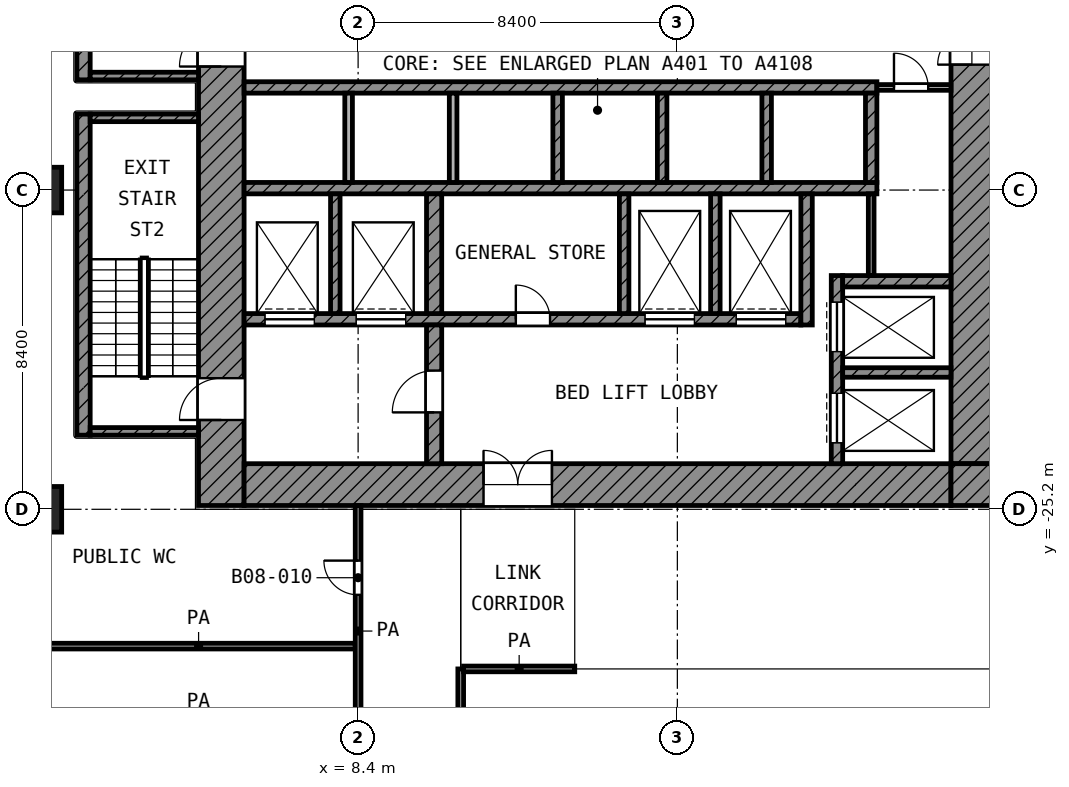
"""IFC4 building model, lengths in metres.
Left out: names, types, materials, properties, quantities, classifications, styles, units other than length and angle.
Written with IfcOpenShell. Run it as: python <this file> out.ifc"""

import sys

from ifc_helpers import new_model, si_unit, direction, frame, frame_2d, origin, origin_2d, place, context, subcontext, project, spatial, rectangle, extrude, element, fill, save


model = new_model("IFC4")
c1 = context("Model", 3, precision=1e-05, world=origin(), true_north=direction((0.0, 1.0)))
c2 = subcontext(c1, "Body", "Model", "MODEL_VIEW")
j1 = project(units=[si_unit("LENGTHUNIT", "METRE"), si_unit("PLANEANGLEUNIT", "RADIAN")], contexts=[c1])
p1 = place(None, origin())
s1 = spatial("IfcSite", under=j1, at=p1, CompositionType="ELEMENT")
p2 = place(p1, origin())
s2 = spatial("IfcBuilding", under=s1, at=p2, CompositionType="ELEMENT")
p3 = place(p2, frame((0.0, 0.0, 39.2)))
s3 = spatial("IfcBuildingStorey", under=s2, at=p3, CompositionType="ELEMENT", Elevation=39.2)
for number, where, z_axis, x_axis in (
    (1, (0.0, -16.8, 0.0), (0.0, 0.0, 1.0), (1.0, 0.0, 0.0)),
    (2, (0.0, -25.2, 0.0), (0.0, 0.0, 1.0), (1.0, 0.0, 0.0)),
):
    element("IfcColumn", number, at=place(p3, frame(where, z_axis=z_axis, x_axis=x_axis)), inside=s3, PredefinedType="COLUMN", context=c2, shape_type="SweptSolid", body=[
        extrude(rectangle(XDim=1.2, YDim=1.2, at=origin_2d()), origin(), (0.0, 0.0, 1.0), 4.2),
    ])
p4 = place(p3, frame((4.8, -25.1, 0.0), z_axis=(0.0, 0.0, 1.0), x_axis=(0.0, 1.0, 0.0)))
e3 = element("IfcWall", 3, at=p4, inside=s3, PredefinedType="SHEAR", context=c2, shape_type="SweptSolid", body=[
    extrude(rectangle(XDim=19.7, YDim=1.2, at=frame_2d((9.85, 0.0))), origin(), (0.0, 0.0, 1.0), 3.9),
])
p5 = place(p4, frame((11.55, 0.0, 0.0)))
e4 = element("IfcOpeningElement", 4, at=p5, cuts=e3, PredefinedType="OPENING", context=c2, shape_type="SweptSolid", body=[
    extrude(rectangle(XDim=1.1, YDim=2.1, at=frame_2d((0.55, 1.05))), frame((0.0, 0.61, 0.0), z_axis=(0.0, -1.0, 0.0), x_axis=(1.0, 0.0, 0.0)), (0.0, 0.0, 1.0), 1.22),
])
p6 = place(p4, frame((2.25, 0.0, 0.0)))
e5 = element("IfcOpeningElement", 5, at=p6, cuts=e3, PredefinedType="OPENING", context=c2, shape_type="SweptSolid", body=[
    extrude(rectangle(XDim=1.1, YDim=2.1, at=frame_2d((0.55, 1.05))), frame((0.0, 0.61, 0.0), z_axis=(0.0, -1.0, 0.0), x_axis=(1.0, 0.0, 0.0)), (0.0, 0.0, 1.0), 1.22),
])
p7 = place(p3, frame((24.55, -24.0, 0.0), z_axis=(0.0, 0.0, 1.0), x_axis=(0.0, 1.0, 0.0)))
e6 = element("IfcWall", 6, at=p7, inside=s3, PredefinedType="SHEAR", context=c2, shape_type="SweptSolid", body=[
    extrude(rectangle(XDim=18.6, YDim=1.1, at=frame_2d((9.3, 0.0))), origin(), (0.0, 0.0, 1.0), 3.9),
])
p8 = place(p7, frame((10.5, 0.0, 0.0)))
e7 = element("IfcOpeningElement", 7, at=p8, cuts=e6, PredefinedType="OPENING", context=c2, shape_type="SweptSolid", body=[
    extrude(rectangle(XDim=1.8, YDim=2.1, at=frame_2d((0.9, 1.05))), frame((0.0, 0.56, 0.0), z_axis=(0.0, -1.0, 0.0), x_axis=(1.0, 0.0, 0.0)), (0.0, 0.0, 1.0), 1.12),
])
p9 = place(p3, frame((5.4, -24.55, 0.0), z_axis=(0.0, 0.0, 1.0), x_axis=(1.0, 0.0, 0.0)))
e8 = element("IfcWall", 8, at=p9, inside=s3, PredefinedType="SHEAR", context=c2, shape_type="SweptSolid", body=[
    extrude(rectangle(XDim=18.6, YDim=1.1, at=frame_2d((9.3, 0.0))), origin(), (0.0, 0.0, 1.0), 3.9),
])
p10 = place(p9, frame((6.3, 0.0, 0.0)))
e9 = element("IfcOpeningElement", 9, at=p10, cuts=e8, PredefinedType="OPENING", context=c2, shape_type="SweptSolid", body=[
    extrude(rectangle(XDim=1.8, YDim=2.1, at=frame_2d((0.9, 1.05))), frame((0.0, 0.56, 0.0), z_axis=(0.0, -1.0, 0.0), x_axis=(1.0, 0.0, 0.0)), (0.0, 0.0, 1.0), 1.12),
])
p11 = place(p3, frame((24.55, -25.1, 0.0), z_axis=(0.0, 0.0, 1.0), x_axis=(0.0, 1.0, 0.0)))
e10 = element("IfcWall", 10, at=p11, inside=s3, PredefinedType="SHEAR", context=c2, shape_type="SweptSolid", body=[
    extrude(rectangle(XDim=1.1, YDim=1.1, at=frame_2d((0.55, 0.0))), origin(), (0.0, 0.0, 1.0), 3.9),
])
for number, where, z_axis, x_axis in (
    (11, (5.4, -14.1, 0.0), (0.0, 0.0, 1.0), (1.0, 0.0, 0.0)),
    (12, (5.4, -16.75, 0.0), (0.0, 0.0, 1.0), (1.0, 0.0, 0.0)),
):
    element("IfcWall", number, at=place(p3, frame(where, z_axis=z_axis, x_axis=x_axis)), inside=s3, PredefinedType="SHEAR", context=c2, shape_type="SweptSolid", body=[
        extrude(rectangle(XDim=16.65, YDim=0.3, at=frame_2d((8.325, 0.0))), origin(), (0.0, 0.0, 1.0), 3.9),
    ])
p12 = place(p3, frame((5.4, -20.2, 0.0), z_axis=(0.0, 0.0, 1.0), x_axis=(1.0, 0.0, 0.0)))
e13 = element("IfcWall", 13, at=p12, inside=s3, PredefinedType="SHEAR", context=c2, shape_type="SweptSolid", body=[
    extrude(rectangle(XDim=14.65, YDim=0.3, at=frame_2d((7.325, 0.0))), origin(), (0.0, 0.0, 1.0), 3.9),
])
p13 = place(p12, frame((10.55, 0.0, 0.0)))
e14 = element("IfcOpeningElement", 14, at=p13, cuts=e13, PredefinedType="OPENING", context=c2, shape_type="SweptSolid", body=[
    extrude(rectangle(XDim=1.3, YDim=2.1, at=frame_2d((0.65, 1.05))), frame((0.0, 0.16, 0.0), z_axis=(0.0, -1.0, 0.0), x_axis=(1.0, 0.0, 0.0)), (0.0, 0.0, 1.0), 0.32),
])
p14 = place(p12, frame((12.95, 0.0, 0.0)))
e15 = element("IfcOpeningElement", 15, at=p14, cuts=e13, PredefinedType="OPENING", context=c2, shape_type="SweptSolid", body=[
    extrude(rectangle(XDim=1.3, YDim=2.1, at=frame_2d((0.65, 1.05))), frame((0.0, 0.16, 0.0), z_axis=(0.0, -1.0, 0.0), x_axis=(1.0, 0.0, 0.0)), (0.0, 0.0, 1.0), 0.32),
])
p15 = place(p12, frame((0.55, 0.0, 0.0)))
e16 = element("IfcOpeningElement", 16, at=p15, cuts=e13, PredefinedType="OPENING", context=c2, shape_type="SweptSolid", body=[
    extrude(rectangle(XDim=1.3, YDim=2.1, at=frame_2d((0.65, 1.05))), frame((0.0, 0.16, 0.0), z_axis=(0.0, -1.0, 0.0), x_axis=(1.0, 0.0, 0.0)), (0.0, 0.0, 1.0), 0.32),
])
p16 = place(p12, frame((2.95, 0.0, 0.0)))
e17 = element("IfcOpeningElement", 17, at=p16, cuts=e13, PredefinedType="OPENING", context=c2, shape_type="SweptSolid", body=[
    extrude(rectangle(XDim=1.3, YDim=2.1, at=frame_2d((0.65, 1.05))), frame((0.0, 0.16, 0.0), z_axis=(0.0, -1.0, 0.0), x_axis=(1.0, 0.0, 0.0)), (0.0, 0.0, 1.0), 0.32),
])
p17 = place(p12, frame((7.15, 0.0, 0.0)))
e18 = element("IfcOpeningElement", 18, at=p17, cuts=e13, PredefinedType="OPENING", context=c2, shape_type="SweptSolid", body=[
    extrude(rectangle(XDim=0.9, YDim=2.1, at=frame_2d((0.45, 1.05))), frame((0.0, 0.16, 0.0), z_axis=(0.0, -1.0, 0.0), x_axis=(1.0, 0.0, 0.0)), (0.0, 0.0, 1.0), 0.32),
])
p18 = place(p3, frame((10.4, -24.0, 0.0), z_axis=(0.0, 0.0, 1.0), x_axis=(0.0, 1.0, 0.0)))
e19 = element("IfcWall", 19, at=p18, inside=s3, PredefinedType="SHEAR", context=c2, shape_type="SweptSolid", body=[
    extrude(rectangle(XDim=3.65, YDim=0.4, at=frame_2d((1.825, 0.0))), origin(), (0.0, 0.0, 1.0), 3.9),
])
p19 = place(p18, frame((1.35, 0.0, 0.0)))
e20 = element("IfcOpeningElement", 20, at=p19, cuts=e19, PredefinedType="OPENING", context=c2, shape_type="SweptSolid", body=[
    extrude(rectangle(XDim=1.1, YDim=2.1, at=frame_2d((0.55, 1.05))), frame((0.0, 0.21, 0.0), z_axis=(0.0, -1.0, 0.0), x_axis=(1.0, 0.0, 0.0)), (0.0, 0.0, 1.0), 0.42),
])
p20 = place(p3, frame((10.4, -20.05, 0.0), z_axis=(0.0, 0.0, 1.0), x_axis=(0.0, 1.0, 0.0)))
e21 = element("IfcWall", 21, at=p20, inside=s3, PredefinedType="SHEAR", context=c2, shape_type="SweptSolid", body=[
    extrude(rectangle(XDim=3.15, YDim=0.4, at=frame_2d((1.575, 0.0))), origin(), (0.0, 0.0, 1.0), 3.9),
])
p21 = place(p3, frame((20.2, -20.35, 0.0), z_axis=(0.0, 0.0, 1.0), x_axis=(0.0, 1.0, 0.0)))
e22 = element("IfcWall", 22, at=p21, inside=s3, PredefinedType="SHEAR", context=c2, shape_type="SweptSolid", body=[
    extrude(rectangle(XDim=3.45, YDim=0.3, at=frame_2d((1.725, 0.0))), origin(), (0.0, 0.0, 1.0), 3.9),
])
p22 = place(p3, frame((21.9, -16.6, 0.0), z_axis=(0.0, 0.0, 1.0), x_axis=(0.0, 1.0, 0.0)))
e23 = element("IfcWall", 23, at=p22, inside=s3, PredefinedType="SHEAR", context=c2, shape_type="SweptSolid", body=[
    extrude(rectangle(XDim=2.35, YDim=0.3, at=frame_2d((1.175, 0.0))), origin(), (0.0, 0.0, 1.0), 3.9),
])
p23 = place(p3, frame((21.15, -19.2, 0.0), z_axis=(0.0, 0.0, 1.0), x_axis=(1.0, 0.0, 0.0)))
e24 = element("IfcWall", 24, at=p23, inside=s3, PredefinedType="SHEAR", context=c2, shape_type="SweptSolid", body=[
    extrude(rectangle(XDim=2.85, YDim=0.3, at=frame_2d((1.425, 0.0))), origin(), (0.0, 0.0, 1.0), 3.9),
])
p24 = place(p3, frame((21.0, -24.0, 0.0), z_axis=(0.0, 0.0, 1.0), x_axis=(0.0, 1.0, 0.0)))
e25 = element("IfcWall", 25, at=p24, inside=s3, PredefinedType="SHEAR", context=c2, shape_type="SweptSolid", body=[
    extrude(rectangle(XDim=4.95, YDim=0.3, at=frame_2d((2.475, 0.0))), origin(), (0.0, 0.0, 1.0), 3.9),
])
p25 = place(p24, frame((2.95, 0.0, 0.0)))
e26 = element("IfcOpeningElement", 26, at=p25, cuts=e25, PredefinedType="OPENING", context=c2, shape_type="SweptSolid", body=[
    extrude(rectangle(XDim=1.3, YDim=2.1, at=frame_2d((0.65, 1.05))), frame((0.0, 0.16, 0.0), z_axis=(0.0, -1.0, 0.0), x_axis=(1.0, 0.0, 0.0)), (0.0, 0.0, 1.0), 0.32),
])
p26 = place(p24, frame((0.55, 0.0, 0.0)))
e27 = element("IfcOpeningElement", 27, at=p26, cuts=e25, PredefinedType="OPENING", context=c2, shape_type="SweptSolid", body=[
    extrude(rectangle(XDim=1.3, YDim=2.1, at=frame_2d((0.65, 1.05))), frame((0.0, 0.16, 0.0), z_axis=(0.0, -1.0, 0.0), x_axis=(1.0, 0.0, 0.0)), (0.0, 0.0, 1.0), 0.32),
])
p27 = place(p3, frame((21.15, -21.6, 0.0), z_axis=(0.0, 0.0, 1.0), x_axis=(1.0, 0.0, 0.0)))
e28 = element("IfcWall", 28, at=p27, inside=s3, PredefinedType="SHEAR", context=c2, shape_type="SweptSolid", body=[
    extrude(rectangle(XDim=2.85, YDim=0.25, at=frame_2d((1.425, 0.0))), origin(), (0.0, 0.0, 1.0), 3.9),
])
for number, where, z_axis, x_axis in (
    (29, (7.8, -20.05, 0.0), (0.0, 0.0, 1.0), (0.0, 1.0, 0.0)),
    (30, (15.4, -20.05, 0.0), (0.0, 0.0, 1.0), (0.0, 1.0, 0.0)),
    (31, (17.8, -20.05, 0.0), (0.0, 0.0, 1.0), (0.0, 1.0, 0.0)),
):
    element("IfcWall", number, at=place(p3, frame(where, z_axis=z_axis, x_axis=x_axis)), inside=s3, PredefinedType="SHEAR", context=c2, shape_type="SweptSolid", body=[
        extrude(rectangle(XDim=3.15, YDim=0.25, at=frame_2d((1.575, 0.0))), origin(), (0.0, 0.0, 1.0), 3.9),
    ])
for number, where, z_axis, x_axis in (
    (32, (8.15, -16.6, 0.0), (0.0, 0.0, 1.0), (0.0, 1.0, 0.0)),
    (33, (10.9, -16.6, 0.0), (0.0, 0.0, 1.0), (0.0, 1.0, 0.0)),
):
    element("IfcWall", number, at=place(p3, frame(where, z_axis=z_axis, x_axis=x_axis)), inside=s3, PredefinedType="PARTITIONING", context=c2, shape_type="SweptSolid", body=[
        extrude(rectangle(XDim=2.35, YDim=0.2, at=frame_2d((1.175, 0.0))), origin(), (0.0, 0.0, 1.0), 3.9),
    ])
for number, where, z_axis, x_axis in (
    (34, (13.65, -16.6, 0.0), (0.0, 0.0, 1.0), (0.0, 1.0, 0.0)),
    (35, (16.4, -16.6, 0.0), (0.0, 0.0, 1.0), (0.0, 1.0, 0.0)),
    (36, (19.15, -16.6, 0.0), (0.0, 0.0, 1.0), (0.0, 1.0, 0.0)),
):
    element("IfcWall", number, at=place(p3, frame(where, z_axis=z_axis, x_axis=x_axis)), inside=s3, PredefinedType="SHEAR", context=c2, shape_type="SweptSolid", body=[
        extrude(rectangle(XDim=2.35, YDim=0.25, at=frame_2d((1.175, 0.0))), origin(), (0.0, 0.0, 1.0), 3.9),
    ])
p28 = place(p3, frame((21.9, -19.05, 0.0), z_axis=(0.0, 0.0, 1.0), x_axis=(0.0, 1.0, 0.0)))
e37 = element("IfcWall", 37, at=p28, inside=s3, PredefinedType="PARTITIONING", context=c2, shape_type="SweptSolid", body=[
    extrude(rectangle(XDim=2.15, YDim=0.15, at=frame_2d((1.075, 0.0))), origin(), (0.0, 0.0, 1.0), 3.9),
])
p29 = place(p3, frame((22.05, -14.1, 0.0), z_axis=(0.0, 0.0, 1.0), x_axis=(1.0, 0.0, 0.0)))
e38 = element("IfcWall", 38, at=p29, inside=s3, PredefinedType="PARTITIONING", context=c2, shape_type="SweptSolid", body=[
    extrude(rectangle(XDim=1.95, YDim=0.15, at=frame_2d((0.975, 0.0))), origin(), (0.0, 0.0, 1.0), 3.9),
])
p30 = place(p29, frame((0.45, 0.0, 0.0)))
e39 = element("IfcOpeningElement", 39, at=p30, cuts=e38, PredefinedType="OPENING", context=c2, shape_type="SweptSolid", body=[
    extrude(rectangle(XDim=0.9, YDim=2.1, at=frame_2d((0.45, 1.05))), frame((0.0, 0.085, 0.0), z_axis=(0.0, -1.0, 0.0), x_axis=(1.0, 0.0, 0.0)), (0.0, 0.0, 1.0), 0.17),
])
p31 = place(p3, frame((1.175, -13.9, 0.0), z_axis=(0.0, 0.0, 1.0), x_axis=(0.0, 1.0, 0.0)))
e40 = element("IfcWall", 40, at=p31, inside=s3, PredefinedType="SHEAR", context=c2, shape_type="SweptSolid", body=[
    extrude(rectangle(XDim=8.45, YDim=0.35, at=frame_2d((4.225, 0.0))), origin(), (0.0, 0.0, 1.0), 3.9),
])
p32 = place(p3, frame((1.35, -13.8, 0.0), z_axis=(0.0, 0.0, 1.0), x_axis=(1.0, 0.0, 0.0)))
e41 = element("IfcWall", 41, at=p32, inside=s3, PredefinedType="SHEAR", context=c2, shape_type="SweptSolid", body=[
    extrude(rectangle(XDim=2.85, YDim=0.2, at=frame_2d((1.425, 0.0))), origin(), (0.0, 0.0, 1.0), 3.9),
])
p33 = place(p3, frame((1.175, -23.25, 0.0), z_axis=(0.0, 0.0, 1.0), x_axis=(0.0, 1.0, 0.0)))
e42 = element("IfcWall", 42, at=p33, inside=s3, PredefinedType="SHEAR", context=c2, shape_type="SweptSolid", body=[
    extrude(rectangle(XDim=8.45, YDim=0.35, at=frame_2d((4.225, 0.0))), origin(), (0.0, 0.0, 1.0), 3.9),
])
for number, where, z_axis, x_axis in (
    (43, (1.35, -14.9, 0.0), (0.0, 0.0, 1.0), (1.0, 0.0, 0.0)),
    (44, (1.35, -23.15, 0.0), (0.0, 0.0, 1.0), (1.0, 0.0, 0.0)),
):
    element("IfcWall", number, at=place(p3, frame(where, z_axis=z_axis, x_axis=x_axis)), inside=s3, PredefinedType="SHEAR", context=c2, shape_type="SweptSolid", body=[
        extrude(rectangle(XDim=2.85, YDim=0.2, at=frame_2d((1.425, 0.0))), origin(), (0.0, 0.0, 1.0), 3.9),
    ])
p34 = place(p3, frame((11.175, -29.4, 0.0), z_axis=(0.0, 0.0, 1.0), x_axis=(1.0, 0.0, 0.0)))
e45 = element("IfcWall", 45, at=p34, inside=s3, PredefinedType="PARTITIONING", context=c2, shape_type="SweptSolid", body=[
    extrude(rectangle(XDim=2.925, YDim=0.15, at=frame_2d((1.462, 0.0))), origin(), (0.0, 0.0, 1.0), 3.9),
])
p35 = place(p3, frame((0.08, -28.8, 0.0), z_axis=(0.0, 0.0, 1.0), x_axis=(1.0, 0.0, 0.0)))
e46 = element("IfcWall", 46, at=p35, inside=s3, PredefinedType="PARTITIONING", context=c2, shape_type="SweptSolid", body=[
    extrude(rectangle(XDim=8.245, YDim=0.15, at=frame_2d((4.123, 0.0))), origin(), (0.0, 0.0, 1.0), 3.9),
])
p36 = place(p3, frame((8.4, -31.707, 0.0), z_axis=(0.0, 0.0, 1.0), x_axis=(0.0, 1.0, 0.0)))
e47 = element("IfcWall", 47, at=p36, inside=s3, PredefinedType="PARTITIONING", context=c2, shape_type="SweptSolid", body=[
    extrude(rectangle(XDim=6.607, YDim=0.15, at=frame_2d((3.303, 0.0))), origin(), (0.0, 0.0, 1.0), 3.9),
])
p37 = place(p36, frame((4.257, 0.0, 0.0)))
e48 = element("IfcOpeningElement", 48, at=p37, cuts=e47, PredefinedType="OPENING", context=c2, shape_type="SweptSolid", body=[
    extrude(rectangle(XDim=0.9, YDim=2.1, at=frame_2d((0.45, 1.05))), frame((0.0, 0.085, 0.0), z_axis=(0.0, -1.0, 0.0), x_axis=(1.0, 0.0, 0.0)), (0.0, 0.0, 1.0), 0.17),
])
p38 = place(p3, frame((11.1, -75.52, 0.0), z_axis=(0.0, 0.0, 1.0), x_axis=(0.0, 1.0, 0.0)))
e49 = element("IfcWall", 49, at=p38, inside=s3, PredefinedType="PARTITIONING", context=c2, shape_type="SweptSolid", body=[
    extrude(rectangle(XDim=46.12, YDim=0.15, at=frame_2d((23.06, 0.0))), origin(), (0.0, 0.0, 1.0), 3.9),
])
p39 = place(p38, frame((40.87, 0.0, 0.0)))
e50 = element("IfcOpeningElement", 50, at=p39, cuts=e49, PredefinedType="OPENING", context=c2, shape_type="SweptSolid", body=[
    extrude(rectangle(XDim=1.5, YDim=2.1, at=frame_2d((0.75, 1.05))), frame((0.0, 0.085, 0.0), z_axis=(0.0, -1.0, 0.0), x_axis=(1.0, 0.0, 0.0)), (0.0, 0.0, 1.0), 0.17),
])
p40 = place(p38, frame((32.62, 0.0, 0.0)))
e51 = element("IfcOpeningElement", 51, at=p40, cuts=e49, PredefinedType="OPENING", context=c2, shape_type="SweptSolid", body=[
    extrude(rectangle(XDim=1.5, YDim=2.1, at=frame_2d((0.75, 1.05))), frame((0.0, 0.085, 0.0), z_axis=(0.0, -1.0, 0.0), x_axis=(1.0, 0.0, 0.0)), (0.0, 0.0, 1.0), 0.17),
])
p41 = place(p38, frame((18.47, 0.0, 0.0)))
e52 = element("IfcOpeningElement", 52, at=p41, cuts=e49, PredefinedType="OPENING", context=c2, shape_type="SweptSolid", body=[
    extrude(rectangle(XDim=1.0, YDim=2.1, at=frame_2d((0.5, 1.05))), frame((0.0, 0.085, 0.0), z_axis=(0.0, -1.0, 0.0), x_axis=(1.0, 0.0, 0.0)), (0.0, 0.0, 1.0), 0.17),
])
p42 = place(p38, frame((3.37, 0.0, 0.0)))
e53 = element("IfcOpeningElement", 53, at=p42, cuts=e49, PredefinedType="OPENING", context=c2, shape_type="SweptSolid", body=[
    extrude(rectangle(XDim=1.5, YDim=2.1, at=frame_2d((0.75, 1.05))), frame((0.0, 0.085, 0.0), z_axis=(0.0, -1.0, 0.0), x_axis=(1.0, 0.0, 0.0)), (0.0, 0.0, 1.0), 0.17),
])
p43 = place(p25, origin())
e54 = element("IfcDoor", 54, at=p43, inside=s3, OperationType="DOUBLE_DOOR_SLIDING", PredefinedType="DOOR", context=c2, shape_type="SweptSolid", body=[
    extrude(rectangle(XDim=1.3, YDim=2.1, at=frame_2d((0.65, 1.05))), frame((0.0, 0.025, 0.0), z_axis=(0.0, -1.0, 0.0), x_axis=(1.0, 0.0, 0.0)), (0.0, 0.0, 1.0), 0.05),
])
fill(e26, e54)
p44 = place(p26, origin())
e55 = element("IfcDoor", 55, at=p44, inside=s3, OperationType="DOUBLE_DOOR_SLIDING", PredefinedType="DOOR", context=c2, shape_type="SweptSolid", body=[
    extrude(rectangle(XDim=1.3, YDim=2.1, at=frame_2d((0.65, 1.05))), frame((0.0, 0.025, 0.0), z_axis=(0.0, -1.0, 0.0), x_axis=(1.0, 0.0, 0.0)), (0.0, 0.0, 1.0), 0.05),
])
fill(e27, e55)
p45 = place(p13, origin())
e56 = element("IfcDoor", 56, at=p45, inside=s3, OperationType="DOUBLE_DOOR_SLIDING", PredefinedType="DOOR", context=c2, shape_type="SweptSolid", body=[
    extrude(rectangle(XDim=1.3, YDim=2.1, at=frame_2d((0.65, 1.05))), frame((0.0, 0.025, 0.0), z_axis=(0.0, -1.0, 0.0), x_axis=(1.0, 0.0, 0.0)), (0.0, 0.0, 1.0), 0.05),
])
fill(e14, e56)
p46 = place(p14, origin())
e57 = element("IfcDoor", 57, at=p46, inside=s3, OperationType="DOUBLE_DOOR_SLIDING", PredefinedType="DOOR", context=c2, shape_type="SweptSolid", body=[
    extrude(rectangle(XDim=1.3, YDim=2.1, at=frame_2d((0.65, 1.05))), frame((0.0, 0.025, 0.0), z_axis=(0.0, -1.0, 0.0), x_axis=(1.0, 0.0, 0.0)), (0.0, 0.0, 1.0), 0.05),
])
fill(e15, e57)
p47 = place(p15, origin())
e58 = element("IfcDoor", 58, at=p47, inside=s3, OperationType="DOUBLE_DOOR_SLIDING", PredefinedType="DOOR", context=c2, shape_type="SweptSolid", body=[
    extrude(rectangle(XDim=1.3, YDim=2.1, at=frame_2d((0.65, 1.05))), frame((0.0, 0.025, 0.0), z_axis=(0.0, -1.0, 0.0), x_axis=(1.0, 0.0, 0.0)), (0.0, 0.0, 1.0), 0.05),
])
fill(e16, e58)
p48 = place(p16, origin())
e59 = element("IfcDoor", 59, at=p48, inside=s3, OperationType="DOUBLE_DOOR_SLIDING", PredefinedType="DOOR", context=c2, shape_type="SweptSolid", body=[
    extrude(rectangle(XDim=1.3, YDim=2.1, at=frame_2d((0.65, 1.05))), frame((0.0, 0.025, 0.0), z_axis=(0.0, -1.0, 0.0), x_axis=(1.0, 0.0, 0.0)), (0.0, 0.0, 1.0), 0.05),
])
fill(e17, e59)
p49 = place(p5, origin())
e60 = element("IfcDoor", 60, at=p49, inside=s3, OperationType="SINGLE_SWING_LEFT", PredefinedType="DOOR", context=c2, shape_type="SweptSolid", body=[
    extrude(rectangle(XDim=1.1, YDim=2.1, at=frame_2d((0.55, 1.05))), frame((0.0, 0.025, 0.0), z_axis=(0.0, -1.0, 0.0), x_axis=(1.0, 0.0, 0.0)), (0.0, 0.0, 1.0), 0.05),
])
fill(e4, e60)
p50 = place(p6, origin())
e61 = element("IfcDoor", 61, at=p50, inside=s3, OperationType="SINGLE_SWING_LEFT", PredefinedType="DOOR", context=c2, shape_type="SweptSolid", body=[
    extrude(rectangle(XDim=1.1, YDim=2.1, at=frame_2d((0.55, 1.05))), frame((0.0, 0.025, 0.0), z_axis=(0.0, -1.0, 0.0), x_axis=(1.0, 0.0, 0.0)), (0.0, 0.0, 1.0), 0.05),
])
fill(e5, e61)
p51 = place(p19, origin())
e62 = element("IfcDoor", 62, at=p51, inside=s3, OperationType="SINGLE_SWING_LEFT", PredefinedType="DOOR", context=c2, shape_type="SweptSolid", body=[
    extrude(rectangle(XDim=1.1, YDim=2.1, at=frame_2d((0.55, 1.05))), frame((0.0, 0.025, 0.0), z_axis=(0.0, -1.0, 0.0), x_axis=(1.0, 0.0, 0.0)), (0.0, 0.0, 1.0), 0.05),
])
fill(e20, e62)
p52 = place(p8, origin())
e63 = element("IfcDoor", 63, at=p52, inside=s3, OperationType="DOUBLE_DOOR_SINGLE_SWING", PredefinedType="DOOR", context=c2, shape_type="SweptSolid", body=[
    extrude(rectangle(XDim=1.8, YDim=2.1, at=frame_2d((0.9, 1.05))), frame((0.0, 0.025, 0.0), z_axis=(0.0, -1.0, 0.0), x_axis=(1.0, 0.0, 0.0)), (0.0, 0.0, 1.0), 0.05),
])
fill(e7, e63)
p53 = place(p10, origin())
e64 = element("IfcDoor", 64, at=p53, inside=s3, OperationType="DOUBLE_DOOR_SINGLE_SWING", PredefinedType="DOOR", context=c2, shape_type="SweptSolid", body=[
    extrude(rectangle(XDim=1.8, YDim=2.1, at=frame_2d((0.9, 1.05))), frame((0.0, 0.025, 0.0), z_axis=(0.0, -1.0, 0.0), x_axis=(1.0, 0.0, 0.0)), (0.0, 0.0, 1.0), 0.05),
])
fill(e9, e64)
p54 = place(p30, origin())
e65 = element("IfcDoor", 65, at=p54, inside=s3, OperationType="SINGLE_SWING_LEFT", PredefinedType="DOOR", context=c2, shape_type="SweptSolid", body=[
    extrude(rectangle(XDim=0.9, YDim=2.1, at=frame_2d((0.45, 1.05))), frame((0.0, 0.025, 0.0), z_axis=(0.0, -1.0, 0.0), x_axis=(1.0, 0.0, 0.0)), (0.0, 0.0, 1.0), 0.05),
])
fill(e39, e65)
p55 = place(p17, origin())
e66 = element("IfcDoor", 66, at=p55, inside=s3, OperationType="SINGLE_SWING_LEFT", PredefinedType="DOOR", context=c2, shape_type="SweptSolid", body=[
    extrude(rectangle(XDim=0.9, YDim=2.1, at=frame_2d((0.45, 1.05))), frame((0.0, 0.025, 0.0), z_axis=(0.0, -1.0, 0.0), x_axis=(1.0, 0.0, 0.0)), (0.0, 0.0, 1.0), 0.05),
])
fill(e18, e66)
p56 = place(p37, origin())
e67 = element("IfcDoor", 67, at=p56, inside=s3, OperationType="SINGLE_SWING_RIGHT", PredefinedType="DOOR", context=c2, shape_type="SweptSolid", body=[
    extrude(rectangle(XDim=0.9, YDim=2.1, at=frame_2d((0.45, 1.05))), frame((0.0, 0.025, 0.0), z_axis=(0.0, -1.0, 0.0), x_axis=(1.0, 0.0, 0.0)), (0.0, 0.0, 1.0), 0.05),
])
fill(e48, e67)
save(model, sys.argv[1])
